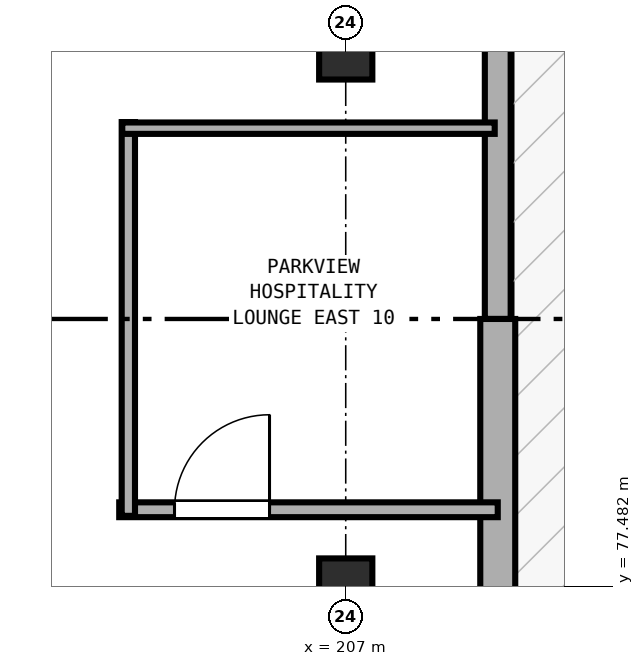
"""IFC4 building model, lengths in metres.
Left out: names, types, materials, properties, quantities, classifications, styles, units other than length and angle.
Written with IfcOpenShell. Run it as: python <this file> out.ifc"""

import sys

from ifc_helpers import new_model, si_unit, direction, frame, frame_2d, origin, origin_2d, place, context, subcontext, project, spatial, rectangle, extrude, element, fill, save


model = new_model("IFC4")
c1 = context("Model", 3, precision=1e-05, world=origin(), true_north=direction((0.0, 1.0)))
c2 = subcontext(c1, "Body", "Model", "MODEL_VIEW")
j1 = project(units=[si_unit("LENGTHUNIT", "METRE"), si_unit("PLANEANGLEUNIT", "RADIAN")], contexts=[c1])
p1 = place(None, origin())
s1 = spatial("IfcSite", under=j1, at=p1, CompositionType="ELEMENT")
p2 = place(p1, origin())
s2 = spatial("IfcBuilding", under=s1, at=p2, CompositionType="ELEMENT")
p3 = place(p2, frame((0.0, 0.0, 14.4)))
s3 = spatial("IfcBuildingStorey", under=s2, at=p3, CompositionType="ELEMENT", Elevation=14.4)
for number, where, z_axis, x_axis in (
    (1, (207.0, 77.4, 0.0), (0.0, 0.0, 1.0), (1.0, 0.0, 0.0)),
    (2, (207.0, 84.6, 0.0), (0.0, 0.0, 1.0), (1.0, 0.0, 0.0)),
):
    element("IfcColumn", number, at=place(p3, frame(where, z_axis=z_axis, x_axis=x_axis)), inside=s3, PredefinedType="COLUMN", context=c2, shape_type="SweptSolid", body=[
        extrude(rectangle(XDim=0.7, YDim=0.9, at=origin_2d()), origin(), (0.0, 0.0, 1.0), 4.8),
    ])
p4 = place(p3, frame((209.0, 89.91, 0.0), z_axis=(0.0, 0.0, 1.0), x_axis=(0.0, -1.0, 0.0)))
e3 = element("IfcWall", 3, at=p4, inside=s3, PredefinedType="SOLIDWALL", context=c2, shape_type="SweptSolid", body=[
    extrude(rectangle(XDim=8.91, YDim=0.34, at=frame_2d((4.455, 0.0))), origin(), (0.0, 0.0, 1.0), 3.58),
])
p5 = place(p3, frame((209.0, 81.0, 0.0), z_axis=(0.0, 0.0, 1.0), x_axis=(0.0, -1.0, 0.0)))
e4 = element("IfcWall", 4, at=p5, inside=s3, PredefinedType="SOLIDWALL", context=c2, shape_type="SweptSolid", body=[
    extrude(rectangle(XDim=8.91, YDim=0.46, at=frame_2d((4.455, 0.0))), origin(), (0.0, 0.0, 1.0), 3.58),
])
p6 = place(p3, frame((204.02, 78.49, 0.0), z_axis=(0.0, 0.0, 1.0), x_axis=(1.0, 0.0, 0.0)))
e5 = element("IfcWall", 5, at=p6, inside=s3, PredefinedType="PARTITIONING", context=c2, shape_type="SweptSolid", body=[
    extrude(rectangle(XDim=4.98, YDim=0.195, at=frame_2d((2.49, 0.0))), origin(), (0.0, 0.0, 1.0), 3.56),
])
p7 = place(p6, frame((0.727, 0.0, 0.0)))
e6 = element("IfcOpeningElement", 6, at=p7, cuts=e5, PredefinedType="OPENING", context=c2, shape_type="SweptSolid", body=[
    extrude(rectangle(XDim=1.25, YDim=2.15, at=frame_2d((0.625, 1.075))), frame((0.0, 0.107, 0.0), z_axis=(0.0, -1.0, 0.0), x_axis=(1.0, 0.0, 0.0)), (0.0, 0.0, 1.0), 0.215),
])
p8 = place(p3, frame((204.14, 78.41, 0.0), z_axis=(0.0, 0.0, 1.0), x_axis=(0.0, 1.0, 0.0)))
e7 = element("IfcWall", 7, at=p8, inside=s3, PredefinedType="PARTITIONING", context=c2, shape_type="SweptSolid", body=[
    extrude(rectangle(XDim=5.18, YDim=0.175, at=frame_2d((2.59, 0.0))), origin(), (0.0, 0.0, 1.0), 3.56),
])
p9 = place(p3, frame((204.06, 83.51, 0.0), z_axis=(0.0, 0.0, 1.0), x_axis=(1.0, 0.0, 0.0)))
e8 = element("IfcWall", 8, at=p9, inside=s3, PredefinedType="PARTITIONING", context=c2, shape_type="SweptSolid", body=[
    extrude(rectangle(XDim=4.9, YDim=0.15, at=frame_2d((2.45, 0.0))), origin(), (0.0, 0.0, 1.0), 3.56),
])
p10 = place(p7, origin())
e9 = element("IfcDoor", 9, at=p10, inside=s3, OperationType="SINGLE_SWING_RIGHT", PredefinedType="DOOR", context=c2, shape_type="SweptSolid", body=[
    extrude(rectangle(XDim=1.25, YDim=2.15, at=frame_2d((0.625, 1.075))), frame((0.0, 0.025, 0.0), z_axis=(0.0, -1.0, 0.0), x_axis=(1.0, 0.0, 0.0)), (0.0, 0.0, 1.0), 0.05),
])
fill(e6, e9)
save(model, sys.argv[1])
